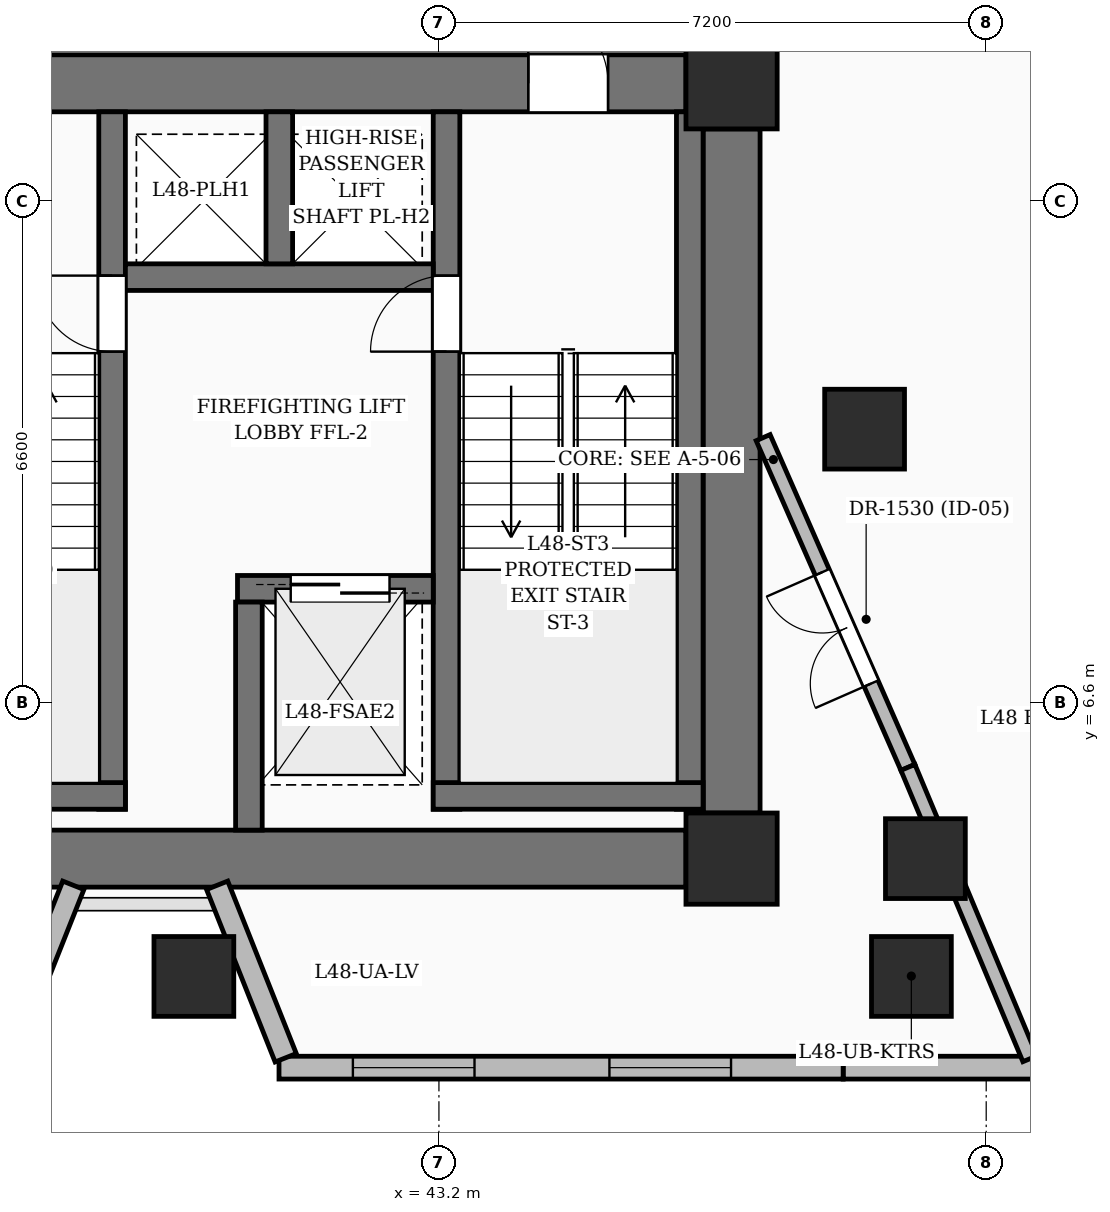
"""IFC4 building model, lengths in metres.
Left out: names, types, materials, properties, quantities, classifications, styles, units other than length and angle.
Written with IfcOpenShell. Run it as: python <this file> out.ifc"""

import sys

from ifc_helpers import new_model, si_unit, direction, frame, frame_2d, origin, origin_2d, place, context, subcontext, project, spatial, rectangle, extrude, element, fill, save


model = new_model("IFC4")
c1 = context("Model", 3, precision=1e-05, world=origin(), true_north=direction((0.0, 1.0)))
c2 = subcontext(c1, "Body", "Model", "MODEL_VIEW")
j1 = project(units=[si_unit("LENGTHUNIT", "METRE"), si_unit("PLANEANGLEUNIT", "RADIAN")], contexts=[c1])
p1 = place(None, origin())
s1 = spatial("IfcSite", under=j1, at=p1, CompositionType="ELEMENT")
p2 = place(p1, origin())
s2 = spatial("IfcBuilding", under=s1, at=p2, CompositionType="ELEMENT")
p3 = place(p2, frame((0.0, 0.0, 186.0)))
s3 = spatial("IfcBuildingStorey", under=s2, at=p3, CompositionType="ELEMENT", Elevation=186.0)
for number, where, z_axis, x_axis in (
    (1, (47.05, 4.55, 0.0), (0.0, 0.0, 1.0), (1.0, 0.0, 0.0)),
    (2, (47.05, 14.75, 0.0), (0.0, 0.0, 1.0), (1.0, 0.0, 0.0)),
):
    element("IfcColumn", number, at=place(p3, frame(where, z_axis=z_axis, x_axis=x_axis)), inside=s3, PredefinedType="COLUMN", context=c2, shape_type="SweptSolid", body=[
        extrude(rectangle(XDim=1.2, YDim=1.2, at=origin_2d()), origin(), (0.0, 0.0, 1.0), 3.6),
    ])
for number, where, z_axis, x_axis in (
    (3, (49.6, 4.55, 0.0), (0.0, 0.0, 1.0), (1.0, 0.0, 0.0)),
    (4, (48.8, 10.2, 0.0), (0.0, 0.0, 1.0), (1.0, 0.0, 0.0)),
):
    element("IfcColumn", number, at=place(p3, frame(where, z_axis=z_axis, x_axis=x_axis)), inside=s3, PredefinedType="COLUMN", context=c2, shape_type="SweptSolid", body=[
        extrude(rectangle(XDim=1.05, YDim=1.05, at=origin_2d()), origin(), (0.0, 0.0, 1.0), 3.6),
    ])
p4 = place(p3, frame((35.75, 4.55, 0.0), z_axis=(0.0, 0.0, 1.0), x_axis=(1.0, 0.0, 0.0)))
e5 = element("IfcWall", 5, at=p4, inside=s3, PredefinedType="SHEAR", context=c2, shape_type="SweptSolid", body=[
    extrude(rectangle(XDim=10.7, YDim=0.75, at=frame_2d((5.35, 0.0))), origin(), (0.0, 0.0, 1.0), 3.6),
])
p5 = place(p3, frame((35.75, 14.75, 0.0), z_axis=(0.0, 0.0, 1.0), x_axis=(1.0, 0.0, 0.0)))
e6 = element("IfcWall", 6, at=p5, inside=s3, PredefinedType="SHEAR", context=c2, shape_type="SweptSolid", body=[
    extrude(rectangle(XDim=10.7, YDim=0.75, at=frame_2d((5.35, 0.0))), origin(), (0.0, 0.0, 1.0), 3.6),
])
p6 = place(p5, frame((1.025, 0.0, 0.0)))
e7 = element("IfcOpeningElement", 7, at=p6, cuts=e6, PredefinedType="OPENING", context=c2, shape_type="SweptSolid", body=[
    extrude(rectangle(XDim=1.05, YDim=2.15, at=frame_2d((0.525, 1.075))), frame((0.0, 0.385, 0.0), z_axis=(0.0, -1.0, 0.0), x_axis=(1.0, 0.0, 0.0)), (0.0, 0.0, 1.0), 0.77),
])
p7 = place(p5, frame((8.625, 0.0, 0.0)))
e8 = element("IfcOpeningElement", 8, at=p7, cuts=e6, PredefinedType="OPENING", context=c2, shape_type="SweptSolid", body=[
    extrude(rectangle(XDim=1.05, YDim=2.15, at=frame_2d((0.525, 1.075))), frame((0.0, 0.385, 0.0), z_axis=(0.0, -1.0, 0.0), x_axis=(1.0, 0.0, 0.0)), (0.0, 0.0, 1.0), 0.77),
])
p8 = place(p3, frame((47.05, 5.15, 0.0), z_axis=(0.0, 0.0, 1.0), x_axis=(0.0, 1.0, 0.0)))
e9 = element("IfcWall", 9, at=p8, inside=s3, PredefinedType="SHEAR", context=c2, shape_type="SweptSolid", body=[
    extrude(rectangle(XDim=9.0, YDim=0.75, at=frame_2d((4.5, 0.0))), origin(), (0.0, 0.0, 1.0), 3.6),
])
p9 = place(p3, frame((38.9, 5.2, 0.0), z_axis=(0.0, 0.0, 1.0), x_axis=(0.0, 1.0, 0.0)))
e10 = element("IfcWall", 10, at=p9, inside=s3, PredefinedType="SOLIDWALL", context=c2, shape_type="SweptSolid", body=[
    extrude(rectangle(XDim=9.175, YDim=0.35, at=frame_2d((4.587, 0.0))), origin(), (0.0, 0.0, 1.0), 3.6),
])
p10 = place(p9, frame((6.02, 0.0, 0.0)))
e11 = element("IfcOpeningElement", 11, at=p10, cuts=e10, PredefinedType="OPENING", context=c2, shape_type="SweptSolid", body=[
    extrude(rectangle(XDim=1.0, YDim=2.15, at=frame_2d((0.5, 1.075))), frame((0.0, 0.185, 0.0), z_axis=(0.0, -1.0, 0.0), x_axis=(1.0, 0.0, 0.0)), (0.0, 0.0, 1.0), 0.37),
])
p11 = place(p3, frame((35.525, 5.375, 0.0), z_axis=(0.0, 0.0, 1.0), x_axis=(1.0, 0.0, 0.0)))
e12 = element("IfcWall", 12, at=p11, inside=s3, PredefinedType="SOLIDWALL", context=c2, shape_type="SweptSolid", body=[
    extrude(rectangle(XDim=3.55, YDim=0.35, at=frame_2d((1.775, 0.0))), origin(), (0.0, 0.0, 1.0), 3.6),
])
p12 = place(p3, frame((43.3, 5.2, 0.0), z_axis=(0.0, 0.0, 1.0), x_axis=(0.0, 1.0, 0.0)))
e13 = element("IfcWall", 13, at=p12, inside=s3, PredefinedType="SOLIDWALL", context=c2, shape_type="SweptSolid", body=[
    extrude(rectangle(XDim=9.175, YDim=0.35, at=frame_2d((4.587, 0.0))), origin(), (0.0, 0.0, 1.0), 3.6),
])
p13 = place(p12, frame((6.02, 0.0, 0.0)))
e14 = element("IfcOpeningElement", 14, at=p13, cuts=e13, PredefinedType="OPENING", context=c2, shape_type="SweptSolid", body=[
    extrude(rectangle(XDim=1.0, YDim=2.15, at=frame_2d((0.5, 1.075))), frame((0.0, 0.185, 0.0), z_axis=(0.0, -1.0, 0.0), x_axis=(1.0, 0.0, 0.0)), (0.0, 0.0, 1.0), 0.37),
])
p14 = place(p3, frame((46.5, 5.2, 0.0), z_axis=(0.0, 0.0, 1.0), x_axis=(0.0, 1.0, 0.0)))
e15 = element("IfcWall", 15, at=p14, inside=s3, PredefinedType="SOLIDWALL", context=c2, shape_type="SweptSolid", body=[
    extrude(rectangle(XDim=9.175, YDim=0.35, at=frame_2d((4.587, 0.0))), origin(), (0.0, 0.0, 1.0), 3.6),
])
p15 = place(p3, frame((43.125, 5.375, 0.0), z_axis=(0.0, 0.0, 1.0), x_axis=(1.0, 0.0, 0.0)))
e16 = element("IfcWall", 16, at=p15, inside=s3, PredefinedType="SOLIDWALL", context=c2, shape_type="SweptSolid", body=[
    extrude(rectangle(XDim=3.55, YDim=0.35, at=frame_2d((1.775, 0.0))), origin(), (0.0, 0.0, 1.0), 3.6),
])
p16 = place(p3, frame((40.55, 8.1, 0.0), z_axis=(0.0, 0.0, 1.0), x_axis=(1.0, 0.0, 0.0)))
e17 = element("IfcWall", 17, at=p16, inside=s3, PredefinedType="SOLIDWALL", context=c2, shape_type="SweptSolid", body=[
    extrude(rectangle(XDim=2.575, YDim=0.35, at=frame_2d((1.288, 0.0))), origin(), (0.0, 0.0, 1.0), 3.6),
])
p17 = place(p16, frame((0.7, 0.0, 0.0)))
e18 = element("IfcOpeningElement", 18, at=p17, cuts=e17, PredefinedType="OPENING", context=c2, shape_type="SweptSolid", body=[
    extrude(rectangle(XDim=1.3, YDim=2.25, at=frame_2d((0.65, 1.125))), frame((0.0, 0.185, 0.0), z_axis=(0.0, -1.0, 0.0), x_axis=(1.0, 0.0, 0.0)), (0.0, 0.0, 1.0), 0.37),
])
p18 = place(p3, frame((40.7, 4.925, 0.0), z_axis=(0.0, 0.0, 1.0), x_axis=(0.0, 1.0, 0.0)))
e19 = element("IfcWall", 19, at=p18, inside=s3, PredefinedType="SOLIDWALL", context=c2, shape_type="SweptSolid", body=[
    extrude(rectangle(XDim=3.0, YDim=0.35, at=frame_2d((1.5, 0.0))), origin(), (0.0, 0.0, 1.0), 3.6),
])
p19 = place(p3, frame((39.075, 12.2, 0.0), z_axis=(0.0, 0.0, 1.0), x_axis=(1.0, 0.0, 0.0)))
e20 = element("IfcWall", 20, at=p19, inside=s3, PredefinedType="SOLIDWALL", context=c2, shape_type="SweptSolid", body=[
    extrude(rectangle(XDim=4.05, YDim=0.35, at=frame_2d((2.025, 0.0))), origin(), (0.0, 0.0, 1.0), 3.6),
])
p20 = place(p3, frame((41.1, 12.375, 0.0), z_axis=(0.0, 0.0, 1.0), x_axis=(0.0, 1.0, 0.0)))
e21 = element("IfcWall", 21, at=p20, inside=s3, PredefinedType="SOLIDWALL", context=c2, shape_type="SweptSolid", body=[
    extrude(rectangle(XDim=2.0, YDim=0.35, at=frame_2d((1.0, 0.0))), origin(), (0.0, 0.0, 1.0), 3.6),
])
for number, where, z_axis, x_axis in (
    (22, (39.976, 3.0, 0.0), (0.0, 0.0, 1.0), (1.0, 0.0, 0.0)),
    (23, (49.416, 3.0, 0.0), (0.0, 0.0, 1.0), (1.0, 0.0, 0.0)),
):
    element("IfcColumn", number, at=place(p3, frame(where, z_axis=z_axis, x_axis=x_axis)), inside=s3, PredefinedType="COLUMN", context=c2, shape_type="SweptSolid", body=[
        extrude(rectangle(XDim=1.05, YDim=1.05, at=origin_2d()), origin(), (0.0, 0.0, 1.0), 3.6),
    ])
p21 = place(p3, frame((55.37, 1.8, 0.0), z_axis=(0.0, 0.0, 1.0), x_axis=(-1.0, 0.0, 0.0)))
e24 = element("IfcWall", 24, at=p21, inside=s3, PredefinedType="SOLIDWALL", context=c2, shape_type="SweptSolid", body=[
    extrude(rectangle(XDim=6.852, YDim=0.3, at=frame_2d((3.426, 0.0))), origin(), (0.0, 0.0, 1.0), 3.35),
])
p22 = place(p21, frame((1.055, 0.0, 0.6)))
e25 = element("IfcOpeningElement", 25, at=p22, cuts=e24, PredefinedType="OPENING", context=c2, shape_type="SweptSolid", body=[
    extrude(rectangle(XDim=1.8, YDim=2.1, at=frame_2d((0.9, 1.05))), frame((0.0, 0.16, 0.0), z_axis=(0.0, -1.0, 0.0), x_axis=(1.0, 0.0, 0.0)), (0.0, 0.0, 1.0), 0.32),
])
p23 = place(p3, frame((48.518, 1.8, 0.0), z_axis=(0.0, 0.0, 1.0), x_axis=(-1.0, 0.0, 0.0)))
e26 = element("IfcWall", 26, at=p23, inside=s3, PredefinedType="SOLIDWALL", context=c2, shape_type="SweptSolid", body=[
    extrude(rectangle(XDim=7.422, YDim=0.3, at=frame_2d((3.711, 0.0))), origin(), (0.0, 0.0, 1.0), 3.35),
])
p24 = place(p23, frame((4.85, 0.0, 0.55)))
e27 = element("IfcOpeningElement", 27, at=p24, cuts=e26, PredefinedType="OPENING", context=c2, shape_type="SweptSolid", body=[
    extrude(rectangle(XDim=1.6, YDim=2.2, at=frame_2d((0.8, 1.1))), frame((0.0, 0.16, 0.0), z_axis=(0.0, -1.0, 0.0), x_axis=(1.0, 0.0, 0.0)), (0.0, 0.0, 1.0), 0.32),
])
p25 = place(p23, frame((1.475, 0.0, 0.55)))
e28 = element("IfcOpeningElement", 28, at=p25, cuts=e26, PredefinedType="OPENING", context=c2, shape_type="SweptSolid", body=[
    extrude(rectangle(XDim=1.6, YDim=2.2, at=frame_2d((0.8, 1.1))), frame((0.0, 0.16, 0.0), z_axis=(0.0, -1.0, 0.0), x_axis=(1.0, 0.0, 0.0)), (0.0, 0.0, 1.0), 0.32),
])
p26 = place(p3, frame((41.184, 1.93, 0.0), z_axis=(0.0, 0.0, 1.0), x_axis=(-0.369476217581, 0.929240186734, 0.0)))
e29 = element("IfcWall", 29, at=p26, inside=s3, PredefinedType="SOLIDWALL", context=c2, shape_type="SweptSolid", body=[
    extrude(rectangle(XDim=2.442, YDim=0.3, at=frame_2d((1.221, 0.0))), origin(), (0.0, 0.0, 1.0), 2.575),
])
p27 = place(p3, frame((38.39, 4.199, 0.0), z_axis=(0.0, 0.0, 1.0), x_axis=(-0.369487569888, -0.929235672851, 0.0)))
e30 = element("IfcWall", 30, at=p27, inside=s3, PredefinedType="SOLIDWALL", context=c2, shape_type="SweptSolid", body=[
    extrude(rectangle(XDim=2.722, YDim=0.3, at=frame_2d((1.361, 0.0))), origin(), (0.0, 0.0, 1.0), 2.469),
])
p28 = place(p3, frame((49.37, 5.75, 0.0), z_axis=(0.0, 0.0, 1.0), x_axis=(-0.402056440703, 0.915614885467, 0.0)))
e31 = element("IfcWall", 31, at=p28, inside=s3, PredefinedType="PARTITIONING", context=c2, shape_type="SweptSolid", body=[
    extrude(rectangle(XDim=4.738, YDim=0.2, at=frame_2d((2.369, 0.0))), origin(), (0.0, 0.0, 1.0), 2.436),
])
p29 = place(p28, frame((1.205, 0.0, 0.0)))
e32 = element("IfcOpeningElement", 32, at=p29, cuts=e31, PredefinedType="OPENING", context=c2, shape_type="SweptSolid", body=[
    extrude(rectangle(XDim=1.6, YDim=2.3, at=frame_2d((0.8, 1.15))), frame((0.0, 0.11, 0.0), z_axis=(0.0, -1.0, 0.0), x_axis=(1.0, 0.0, 0.0)), (0.0, 0.0, 1.0), 0.22),
])
p30 = place(p3, frame((50.975, 1.917, 0.0), z_axis=(0.0, 0.0, 1.0), x_axis=(-0.386233418948, 0.922401076586, 0.0)))
e33 = element("IfcWall", 33, at=p30, inside=s3, PredefinedType="PARTITIONING", context=c2, shape_type="SweptSolid", body=[
    extrude(rectangle(XDim=4.156, YDim=0.2, at=frame_2d((2.078, 0.0))), origin(), (0.0, 0.0, 1.0), 2.57),
])
p31 = place(p3, frame((50.774, 18.47, 0.0), z_axis=(0.0, 0.0, 1.0), x_axis=(-0.70755309569, -0.706660184798, 0.0)))
e34 = element("IfcWall", 34, at=p31, inside=s3, PredefinedType="PARTITIONING", context=c2, shape_type="SweptSolid", body=[
    extrude(rectangle(XDim=4.648, YDim=0.2, at=frame_2d((2.324, 0.0))), origin(), (0.0, 0.0, 1.0), 2.464),
])
p32 = place(p31, frame((1.813, 0.0, 0.0)))
e35 = element("IfcOpeningElement", 35, at=p32, cuts=e34, PredefinedType="OPENING", context=c2, shape_type="SweptSolid", body=[
    extrude(rectangle(XDim=1.6, YDim=2.3, at=frame_2d((0.8, 1.15))), frame((0.0, 0.11, 0.0), z_axis=(0.0, -1.0, 0.0), x_axis=(1.0, 0.0, 0.0)), (0.0, 0.0, 1.0), 0.22),
])
p33 = place(p24, origin())
e36 = element("IfcWindow", 36, at=p33, inside=s3, PartitioningType="SINGLE_PANEL", PredefinedType="WINDOW", context=c2, shape_type="SweptSolid", body=[
    extrude(rectangle(XDim=1.6, YDim=2.2, at=frame_2d((0.8, 1.1))), frame((0.0, 0.03, 0.0), z_axis=(0.0, -1.0, 0.0), x_axis=(1.0, 0.0, 0.0)), (0.0, 0.0, 1.0), 0.06),
])
fill(e27, e36)
p34 = place(p25, origin())
e37 = element("IfcWindow", 37, at=p34, inside=s3, PartitioningType="SINGLE_PANEL", PredefinedType="WINDOW", context=c2, shape_type="SweptSolid", body=[
    extrude(rectangle(XDim=1.6, YDim=2.2, at=frame_2d((0.8, 1.1))), frame((0.0, 0.03, 0.0), z_axis=(0.0, -1.0, 0.0), x_axis=(1.0, 0.0, 0.0)), (0.0, 0.0, 1.0), 0.06),
])
fill(e28, e37)
p35 = place(p7, origin())
e38 = element("IfcDoor", 38, at=p35, inside=s3, OperationType="SINGLE_SWING_LEFT", PredefinedType="DOOR", context=c2, shape_type="SweptSolid", body=[
    extrude(rectangle(XDim=1.05, YDim=2.15, at=frame_2d((0.525, 1.075))), frame((0.0, 0.025, 0.0), z_axis=(0.0, -1.0, 0.0), x_axis=(1.0, 0.0, 0.0)), (0.0, 0.0, 1.0), 0.05),
])
fill(e8, e38)
p36 = place(p10, origin())
e39 = element("IfcDoor", 39, at=p36, inside=s3, OperationType="SINGLE_SWING_RIGHT", PredefinedType="DOOR", context=c2, shape_type="SweptSolid", body=[
    extrude(rectangle(XDim=1.0, YDim=2.15, at=frame_2d((0.5, 1.075))), frame((0.0, 0.025, 0.0), z_axis=(0.0, -1.0, 0.0), x_axis=(1.0, 0.0, 0.0)), (0.0, 0.0, 1.0), 0.05),
])
fill(e11, e39)
p37 = place(p13, origin())
e40 = element("IfcDoor", 40, at=p37, inside=s3, OperationType="SINGLE_SWING_LEFT", PredefinedType="DOOR", context=c2, shape_type="SweptSolid", body=[
    extrude(rectangle(XDim=1.0, YDim=2.15, at=frame_2d((0.5, 1.075))), frame((0.0, 0.025, 0.0), z_axis=(0.0, -1.0, 0.0), x_axis=(1.0, 0.0, 0.0)), (0.0, 0.0, 1.0), 0.05),
])
fill(e14, e40)
p38 = place(p17, origin())
e41 = element("IfcDoor", 41, at=p38, inside=s3, OperationType="DOUBLE_DOOR_SLIDING", PredefinedType="DOOR", context=c2, shape_type="SweptSolid", body=[
    extrude(rectangle(XDim=1.3, YDim=2.25, at=frame_2d((0.65, 1.125))), frame((0.0, 0.025, 0.0), z_axis=(0.0, -1.0, 0.0), x_axis=(1.0, 0.0, 0.0)), (0.0, 0.0, 1.0), 0.05),
])
fill(e18, e41)
p39 = place(p29, origin())
e42 = element("IfcDoor", 42, at=p39, inside=s3, OperationType="DOUBLE_DOOR_SINGLE_SWING", PredefinedType="DOOR", context=c2, shape_type="SweptSolid", body=[
    extrude(rectangle(XDim=1.6, YDim=2.3, at=frame_2d((0.8, 1.15))), frame((0.0, 0.025, 0.0), z_axis=(0.0, -1.0, 0.0), x_axis=(1.0, 0.0, 0.0)), (0.0, 0.0, 1.0), 0.05),
])
fill(e32, e42)
save(model, sys.argv[1])
